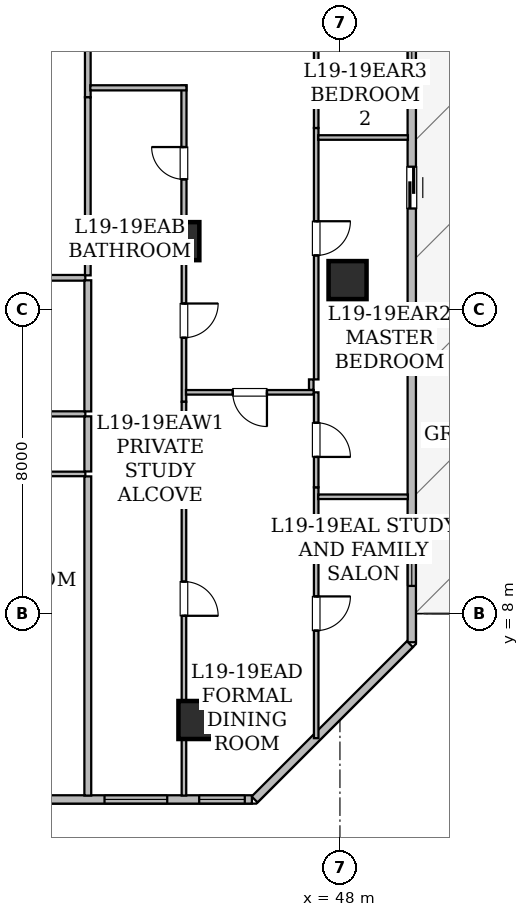
"""IFC4 building model, lengths in metres.
Left out: names, types, materials, properties, quantities, classifications, styles, units other than length and angle.
Written with IfcOpenShell. Run it as: python <this file> out.ifc"""

import sys

from ifc_helpers import new_model, si_unit, direction, frame, frame_2d, origin, origin_2d, place, context, subcontext, project, spatial, rectangle, hollow_rectangle, extrude, element, fill, save


model = new_model("IFC4")
c1 = context("Model", 3, precision=1e-05, world=origin(), true_north=direction((0.0, 1.0)))
c2 = subcontext(c1, "Body", "Model", "MODEL_VIEW")
j1 = project(units=[si_unit("LENGTHUNIT", "METRE"), si_unit("PLANEANGLEUNIT", "RADIAN")], contexts=[c1])
p1 = place(None, origin())
s1 = spatial("IfcSite", under=j1, at=p1, CompositionType="ELEMENT")
p2 = place(p1, origin())
s2 = spatial("IfcBuilding", under=s1, at=p2, CompositionType="ELEMENT")
p3 = place(p2, frame((0.0, 0.0, 77.1)))
s3 = spatial("IfcBuildingStorey", under=s2, at=p3, CompositionType="ELEMENT", Elevation=77.1)
for number, where, z_axis, x_axis in (
    (1, (44.25, 5.2, 0.0), (0.0, 0.0, 1.0), (1.0, 0.0, 0.0)),
    (2, (48.2, 16.775, 0.0), (0.0, 0.0, 1.0), (1.0, 0.0, 0.0)),
    (3, (43.8, 17.8, 0.0), (0.0, 0.0, 1.0), (1.0, 0.0, 0.0)),
):
    element("IfcColumn", number, at=place(p3, frame(where, z_axis=z_axis, x_axis=x_axis)), inside=s3, PredefinedType="COLUMN", context=c2, shape_type="SweptSolid", body=[
        extrude(hollow_rectangle(XDim=1.0, YDim=1.0, WallThickness=0.05, at=origin_2d()), origin(), (0.0, 0.0, 1.0), 3.65),
    ])
p4 = place(p3, frame((49.89, 24.707, 0.0), z_axis=(0.0, 0.0, 1.0), x_axis=(0.0, -1.0, 0.0)))
e4 = element("IfcWall", 4, at=p4, inside=s3, PredefinedType="STANDARD", context=c2, shape_type="SweptSolid", body=[
    extrude(rectangle(XDim=17.461, YDim=0.22, at=frame_2d((8.73, 0.0))), origin(), (0.0, 0.0, 1.0), 3.43),
])
p5 = place(p4, frame((4.948, 0.0, 0.0)))
e5 = element("IfcOpeningElement", 5, at=p5, cuts=e4, PredefinedType="OPENING", context=c2, shape_type="SweptSolid", body=[
    extrude(rectangle(XDim=1.1, YDim=2.2, at=frame_2d((0.55, 1.1))), frame((0.0, 0.12, 0.0), z_axis=(0.0, -1.0, 0.0), x_axis=(1.0, 0.0, 0.0)), (0.0, 0.0, 1.0), 0.24),
])
p6 = place(p4, frame((14.329, 0.0, 0.85)))
e6 = element("IfcOpeningElement", 6, at=p6, cuts=e4, PredefinedType="OPENING", context=c2, shape_type="SweptSolid", body=[
    extrude(rectangle(XDim=1.65, YDim=1.55, at=frame_2d((0.825, 0.775))), frame((0.0, 0.12, 0.0), z_axis=(0.0, -1.0, 0.0), x_axis=(1.0, 0.0, 0.0)), (0.0, 0.0, 1.0), 0.24),
])
p7 = place(p4, frame((1.657, 0.0, 0.85)))
e7 = element("IfcOpeningElement", 7, at=p7, cuts=e4, PredefinedType="OPENING", context=c2, shape_type="SweptSolid", body=[
    extrude(rectangle(XDim=1.65, YDim=1.55, at=frame_2d((0.825, 0.775))), frame((0.0, 0.12, 0.0), z_axis=(0.0, -1.0, 0.0), x_axis=(1.0, 0.0, 0.0)), (0.0, 0.0, 1.0), 0.24),
])
p8 = place(p3, frame((49.84, 7.196, 0.0), z_axis=(0.0, 0.0, 1.0), x_axis=(-0.707127905562, -0.70708565618, 0.0)))
e8 = element("IfcWall", 8, at=p8, inside=s3, PredefinedType="STANDARD", context=c2, shape_type="SweptSolid", body=[
    extrude(rectangle(XDim=5.779, YDim=0.22, at=frame_2d((2.889, 0.0))), origin(), (0.0, 0.0, 1.0), 3.43),
])
p9 = place(p3, frame((45.683, 3.11, 0.0), z_axis=(0.0, 0.0, 1.0), x_axis=(-1.0, 0.0, 0.0)))
e9 = element("IfcWall", 9, at=p9, inside=s3, PredefinedType="STANDARD", context=c2, shape_type="SweptSolid", body=[
    extrude(rectangle(XDim=37.368, YDim=0.22, at=frame_2d((18.684, 0.0))), origin(), (0.0, 0.0, 1.0), 3.43),
])
p10 = place(p9, frame((31.194, 0.0, 0.85)))
e10 = element("IfcOpeningElement", 10, at=p10, cuts=e9, PredefinedType="OPENING", context=c2, shape_type="SweptSolid", body=[
    extrude(rectangle(XDim=1.65, YDim=1.55, at=frame_2d((0.825, 0.775))), frame((0.0, 0.12, 0.0), z_axis=(0.0, -1.0, 0.0), x_axis=(1.0, 0.0, 0.0)), (0.0, 0.0, 1.0), 0.24),
])
p11 = place(p9, frame((19.615, 0.0, 0.85)))
e11 = element("IfcOpeningElement", 11, at=p11, cuts=e9, PredefinedType="OPENING", context=c2, shape_type="SweptSolid", body=[
    extrude(rectangle(XDim=1.65, YDim=1.55, at=frame_2d((0.825, 0.775))), frame((0.0, 0.12, 0.0), z_axis=(0.0, -1.0, 0.0), x_axis=(1.0, 0.0, 0.0)), (0.0, 0.0, 1.0), 0.24),
])
p12 = place(p9, frame((22.223, 0.0, 0.8)))
e12 = element("IfcOpeningElement", 12, at=p12, cuts=e9, PredefinedType="OPENING", context=c2, shape_type="SweptSolid", body=[
    extrude(rectangle(XDim=1.2, YDim=1.5, at=frame_2d((0.6, 0.75))), frame((0.0, 0.12, 0.0), z_axis=(0.0, -1.0, 0.0), x_axis=(1.0, 0.0, 0.0)), (0.0, 0.0, 1.0), 0.24),
])
p13 = place(p9, frame((25.65, 0.0, 0.85)))
e13 = element("IfcOpeningElement", 13, at=p13, cuts=e9, PredefinedType="OPENING", context=c2, shape_type="SweptSolid", body=[
    extrude(rectangle(XDim=1.65, YDim=1.55, at=frame_2d((0.825, 0.775))), frame((0.0, 0.12, 0.0), z_axis=(0.0, -1.0, 0.0), x_axis=(1.0, 0.0, 0.0)), (0.0, 0.0, 1.0), 0.24),
])
p14 = place(p9, frame((10.983, 0.0, 0.8)))
e14 = element("IfcOpeningElement", 14, at=p14, cuts=e9, PredefinedType="OPENING", context=c2, shape_type="SweptSolid", body=[
    extrude(rectangle(XDim=1.2, YDim=1.5, at=frame_2d((0.6, 0.75))), frame((0.0, 0.12, 0.0), z_axis=(0.0, -1.0, 0.0), x_axis=(1.0, 0.0, 0.0)), (0.0, 0.0, 1.0), 0.24),
])
p15 = place(p9, frame((14.783, 0.0, 0.85)))
e15 = element("IfcOpeningElement", 15, at=p15, cuts=e9, PredefinedType="OPENING", context=c2, shape_type="SweptSolid", body=[
    extrude(rectangle(XDim=1.65, YDim=1.55, at=frame_2d((0.825, 0.775))), frame((0.0, 0.12, 0.0), z_axis=(0.0, -1.0, 0.0), x_axis=(1.0, 0.0, 0.0)), (0.0, 0.0, 1.0), 0.24),
])
p16 = place(p9, frame((6.733, 0.0, 0.85)))
e16 = element("IfcOpeningElement", 16, at=p16, cuts=e9, PredefinedType="OPENING", context=c2, shape_type="SweptSolid", body=[
    extrude(rectangle(XDim=1.65, YDim=1.55, at=frame_2d((0.825, 0.775))), frame((0.0, 0.12, 0.0), z_axis=(0.0, -1.0, 0.0), x_axis=(1.0, 0.0, 0.0)), (0.0, 0.0, 1.0), 0.24),
])
p17 = place(p9, frame((2.228, 0.0, 0.85)))
e17 = element("IfcOpeningElement", 17, at=p17, cuts=e9, PredefinedType="OPENING", context=c2, shape_type="SweptSolid", body=[
    extrude(rectangle(XDim=1.65, YDim=1.55, at=frame_2d((0.825, 0.775))), frame((0.0, 0.12, 0.0), z_axis=(0.0, -1.0, 0.0), x_axis=(1.0, 0.0, 0.0)), (0.0, 0.0, 1.0), 0.24),
])
p18 = place(p9, frame((0.187, 0.0, 0.8)))
e18 = element("IfcOpeningElement", 18, at=p18, cuts=e9, PredefinedType="OPENING", context=c2, shape_type="SweptSolid", body=[
    extrude(rectangle(XDim=1.2, YDim=1.5, at=frame_2d((0.6, 0.75))), frame((0.0, 0.12, 0.0), z_axis=(0.0, -1.0, 0.0), x_axis=(1.0, 0.0, 0.0)), (0.0, 0.0, 1.0), 0.24),
])
p19 = place(p3, frame((41.3, 16.835, 0.0), z_axis=(0.0, 0.0, 1.0), x_axis=(-1.0, 0.0, 0.0)))
e19 = element("IfcWall", 19, at=p19, inside=s3, PredefinedType="STANDARD", context=c2, shape_type="SweptSolid", body=[
    extrude(rectangle(XDim=7.001, YDim=0.15, at=frame_2d((3.5, 0.0))), origin(), (0.0, 0.0, 1.0), 3.43),
])
p20 = place(p3, frame((41.365, 18.118, 0.0), z_axis=(0.0, 0.0, 1.0), x_axis=(0.0, -1.0, 0.0)))
e20 = element("IfcWall", 20, at=p20, inside=s3, PredefinedType="STANDARD", context=c2, shape_type="SweptSolid", body=[
    extrude(rectangle(XDim=1.218, YDim=0.15, at=frame_2d((0.609, 0.0))), origin(), (0.0, 0.0, 1.0), 3.43),
])
p21 = place(p3, frame((41.365, 24.283, 0.0), z_axis=(0.0, 0.0, 1.0), x_axis=(0.0, -1.0, 0.0)))
e21 = element("IfcWall", 21, at=p21, inside=s3, PredefinedType="STANDARD", context=c2, shape_type="SweptSolid", body=[
    extrude(rectangle(XDim=2.698, YDim=0.15, at=frame_2d((1.349, 0.0))), origin(), (0.0, 0.0, 1.0), 3.43),
])
p22 = place(p3, frame((41.365, 21.585, 0.0), z_axis=(0.0, 0.0, 1.0), x_axis=(0.0, -1.0, 0.0)))
e22 = element("IfcWall", 22, at=p22, inside=s3, PredefinedType="STANDARD", context=c2, shape_type="SweptSolid", body=[
    extrude(rectangle(XDim=3.467, YDim=0.15, at=frame_2d((1.733, 0.0))), origin(), (0.0, 0.0, 1.0), 2.647),
])
p23 = place(p3, frame((33.985, 13.255, 0.0), z_axis=(0.0, 0.0, 1.0), x_axis=(1.0, 0.0, 0.0)))
e23 = element("IfcWall", 23, at=p23, inside=s3, PredefinedType="PARTITIONING", context=c2, shape_type="SweptSolid", body=[
    extrude(rectangle(XDim=7.315, YDim=0.135, at=frame_2d((3.657, 0.0))), origin(), (0.0, 0.0, 1.0), 3.43),
])
p24 = place(p23, frame((3.233, 0.0, 0.0)))
e24 = element("IfcOpeningElement", 24, at=p24, cuts=e23, PredefinedType="OPENING", context=c2, shape_type="SweptSolid", body=[
    extrude(rectangle(XDim=0.85, YDim=2.1, at=frame_2d((0.425, 1.05))), frame((0.0, 0.077, 0.0), z_axis=(0.0, -1.0, 0.0), x_axis=(1.0, 0.0, 0.0)), (0.0, 0.0, 1.0), 0.155),
])
p25 = place(p3, frame((41.3, 11.675, 0.0), z_axis=(0.0, 0.0, 1.0), x_axis=(-1.0, 0.0, 0.0)))
e25 = element("IfcWall", 25, at=p25, inside=s3, PredefinedType="PARTITIONING", context=c2, shape_type="SweptSolid", body=[
    extrude(rectangle(XDim=6.48, YDim=0.12, at=frame_2d((3.24, 0.0))), origin(), (0.0, 0.0, 1.0), 3.43),
])
p26 = place(p3, frame((41.365, 13.19, 0.0), z_axis=(0.0, 0.0, 1.0), x_axis=(0.0, -1.0, 0.0)))
e26 = element("IfcWall", 26, at=p26, inside=s3, PredefinedType="STANDARD", context=c2, shape_type="SweptSolid", body=[
    extrude(rectangle(XDim=1.45, YDim=0.18, at=frame_2d((0.725, 0.0))), origin(), (0.0, 0.0, 1.0), 3.43),
])
p27 = place(p3, frame((41.365, 16.77, 0.0), z_axis=(0.0, 0.0, 1.0), x_axis=(0.0, -1.0, 0.0)))
e27 = element("IfcWall", 27, at=p27, inside=s3, PredefinedType="STANDARD", context=c2, shape_type="SweptSolid", body=[
    extrude(rectangle(XDim=3.45, YDim=0.18, at=frame_2d((1.725, 0.0))), origin(), (0.0, 0.0, 1.0), 3.43),
])
p28 = place(p3, frame((41.365, 11.61, 0.0), z_axis=(0.0, 0.0, 1.0), x_axis=(0.0, -1.0, 0.0)))
e28 = element("IfcWall", 28, at=p28, inside=s3, PredefinedType="STANDARD", context=c2, shape_type="SweptSolid", body=[
    extrude(rectangle(XDim=8.398, YDim=0.18, at=frame_2d((4.199, 0.0))), origin(), (0.0, 0.0, 1.0), 2.803),
])
p29 = place(p3, frame((43.895, 17.804, 0.0), z_axis=(0.0, 0.0, 1.0), x_axis=(0.0, -1.0, 0.0)))
e29 = element("IfcWall", 29, at=p29, inside=s3, PredefinedType="PARTITIONING", context=c2, shape_type="SweptSolid", body=[
    extrude(rectangle(XDim=4.231, YDim=0.12, at=frame_2d((2.115, 0.0))), origin(), (0.0, 0.0, 1.0), 2.647),
])
p30 = place(p29, frame((1.645, 0.0, 0.0)))
e30 = element("IfcOpeningElement", 30, at=p30, cuts=e29, PredefinedType="OPENING", context=c2, shape_type="SweptSolid", body=[
    extrude(rectangle(XDim=0.9, YDim=2.1, at=frame_2d((0.45, 1.05))), frame((0.0, 0.07, 0.0), z_axis=(0.0, -1.0, 0.0), x_axis=(1.0, 0.0, 0.0)), (0.0, 0.0, 1.0), 0.14),
])
p31 = place(p3, frame((43.895, 13.573, 0.0), z_axis=(0.0, 0.0, 1.0), x_axis=(0.0, -1.0, 0.0)))
e31 = element("IfcWall", 31, at=p31, inside=s3, PredefinedType="PARTITIONING", context=c2, shape_type="SweptSolid", body=[
    extrude(rectangle(XDim=10.361, YDim=0.12, at=frame_2d((5.181, 0.0))), origin(), (0.0, 0.0, 1.0), 2.647),
])
p32 = place(p31, frame((4.731, 0.0, 0.0)))
e32 = element("IfcOpeningElement", 32, at=p32, cuts=e31, PredefinedType="OPENING", context=c2, shape_type="SweptSolid", body=[
    extrude(rectangle(XDim=0.9, YDim=2.1, at=frame_2d((0.45, 1.05))), frame((0.0, 0.07, 0.0), z_axis=(0.0, -1.0, 0.0), x_axis=(1.0, 0.0, 0.0)), (0.0, 0.0, 1.0), 0.14),
])
p33 = place(p3, frame((41.432, 17.869, 0.0), z_axis=(0.0, 0.0, 1.0), x_axis=(1.0, 0.0, 0.0)))
e33 = element("IfcWall", 33, at=p33, inside=s3, PredefinedType="PARTITIONING", context=c2, shape_type="SweptSolid", body=[
    extrude(rectangle(XDim=2.398, YDim=0.135, at=frame_2d((1.199, 0.0))), origin(), (0.0, 0.0, 1.0), 2.647),
])
p34 = place(p3, frame((47.31, 13.822, 0.0), z_axis=(0.0, 0.0, 1.0), x_axis=(-1.0, 0.0, 0.0)))
e34 = element("IfcWall", 34, at=p34, inside=s3, PredefinedType="PARTITIONING", context=c2, shape_type="SweptSolid", body=[
    extrude(rectangle(XDim=3.361, YDim=0.12, at=frame_2d((1.681, 0.0))), origin(), (0.0, 0.0, 1.0), 2.647),
])
p35 = place(p34, frame((1.231, 0.0, 0.0)))
e35 = element("IfcOpeningElement", 35, at=p35, cuts=e34, PredefinedType="OPENING", context=c2, shape_type="SweptSolid", body=[
    extrude(rectangle(XDim=0.9, YDim=2.1, at=frame_2d((0.45, 1.05))), frame((0.0, 0.07, 0.0), z_axis=(0.0, -1.0, 0.0), x_axis=(1.0, 0.0, 0.0)), (0.0, 0.0, 1.0), 0.14),
])
p36 = place(p3, frame((47.245, 14.162, 0.0), z_axis=(0.0, 0.0, 1.0), x_axis=(0.0, -1.0, 0.0)))
e36 = element("IfcWall", 36, at=p36, inside=s3, PredefinedType="PARTITIONING", context=c2, shape_type="SweptSolid", body=[
    extrude(rectangle(XDim=0.275, YDim=0.12, at=frame_2d((0.138, 0.0))), origin(), (0.0, 0.0, 1.0), 2.803),
])
p37 = place(p3, frame((43.895, 17.804, 0.0), z_axis=(0.0, 0.0, 1.0), x_axis=(0.0, 1.0, 0.0)))
e37 = element("IfcWall", 37, at=p37, inside=s3, PredefinedType="PARTITIONING", context=c2, shape_type="SweptSolid", body=[
    extrude(rectangle(XDim=4.095, YDim=0.135, at=frame_2d((2.047, 0.0))), origin(), (0.0, 0.0, 1.0), 2.647),
])
p38 = place(p37, frame((1.622, 0.0, 0.0)))
e38 = element("IfcOpeningElement", 38, at=p38, cuts=e37, PredefinedType="OPENING", context=c2, shape_type="SweptSolid", body=[
    extrude(rectangle(XDim=0.85, YDim=2.1, at=frame_2d((0.425, 1.05))), frame((0.0, 0.077, 0.0), z_axis=(0.0, -1.0, 0.0), x_axis=(1.0, 0.0, 0.0)), (0.0, 0.0, 1.0), 0.155),
])
p39 = place(p3, frame((43.96, 21.834, 0.0), z_axis=(0.0, 0.0, 1.0), x_axis=(-1.0, 0.0, 0.0)))
e39 = element("IfcWall", 39, at=p39, inside=s3, PredefinedType="PARTITIONING", context=c2, shape_type="SweptSolid", body=[
    extrude(rectangle(XDim=2.528, YDim=0.135, at=frame_2d((1.264, 0.0))), origin(), (0.0, 0.0, 1.0), 2.647),
])
p40 = place(p3, frame((47.375, 20.777, 0.0), z_axis=(0.0, 0.0, 1.0), x_axis=(0.0, -1.0, 0.0)))
e40 = element("IfcWall", 40, at=p40, inside=s3, PredefinedType="PARTITIONING", context=c2, shape_type="SweptSolid", body=[
    extrude(rectangle(XDim=6.615, YDim=0.12, at=frame_2d((3.308, 0.0))), origin(), (0.0, 0.0, 1.0), 2.647),
])
p41 = place(p40, frame((2.453, 0.0, 0.0)))
e41 = element("IfcOpeningElement", 41, at=p41, cuts=e40, PredefinedType="OPENING", context=c2, shape_type="SweptSolid", body=[
    extrude(rectangle(XDim=0.9, YDim=2.1, at=frame_2d((0.45, 1.05))), frame((0.0, 0.07, 0.0), z_axis=(0.0, -1.0, 0.0), x_axis=(1.0, 0.0, 0.0)), (0.0, 0.0, 1.0), 0.14),
])
p42 = place(p3, frame((47.375, 31.47, 0.0), z_axis=(0.0, 0.0, 1.0), x_axis=(0.0, -1.0, 0.0)))
e42 = element("IfcWall", 42, at=p42, inside=s3, PredefinedType="PARTITIONING", context=c2, shape_type="SweptSolid", body=[
    extrude(rectangle(XDim=10.693, YDim=0.12, at=frame_2d((5.346, 0.0))), origin(), (0.0, 0.0, 1.0), 2.961),
])
p43 = place(p42, frame((4.896, 0.0, 0.0)))
e43 = element("IfcOpeningElement", 43, at=p43, cuts=e42, PredefinedType="OPENING", context=c2, shape_type="SweptSolid", body=[
    extrude(rectangle(XDim=0.9, YDim=2.1, at=frame_2d((0.45, 1.05))), frame((0.0, 0.07, 0.0), z_axis=(0.0, -1.0, 0.0), x_axis=(1.0, 0.0, 0.0)), (0.0, 0.0, 1.0), 0.14),
])
p44 = place(p3, frame((47.375, 11.323, 0.0), z_axis=(0.0, 0.0, 1.0), x_axis=(0.0, -1.0, 0.0)))
e44 = element("IfcWall", 44, at=p44, inside=s3, PredefinedType="PARTITIONING", context=c2, shape_type="SweptSolid", body=[
    extrude(rectangle(XDim=6.601, YDim=0.12, at=frame_2d((3.301, 0.0))), origin(), (0.0, 0.0, 1.0), 3.43),
])
p45 = place(p44, frame((2.871, 0.0, 0.0)))
e45 = element("IfcOpeningElement", 45, at=p45, cuts=e44, PredefinedType="OPENING", context=c2, shape_type="SweptSolid", body=[
    extrude(rectangle(XDim=0.9, YDim=2.1, at=frame_2d((0.45, 1.05))), frame((0.0, 0.07, 0.0), z_axis=(0.0, -1.0, 0.0), x_axis=(1.0, 0.0, 0.0)), (0.0, 0.0, 1.0), 0.14),
])
p46 = place(p3, frame((47.375, 13.822, 0.0), z_axis=(0.0, 0.0, 1.0), x_axis=(0.0, -1.0, 0.0)))
e46 = element("IfcWall", 46, at=p46, inside=s3, PredefinedType="PARTITIONING", context=c2, shape_type="SweptSolid", body=[
    extrude(rectangle(XDim=2.499, YDim=0.12, at=frame_2d((1.25, 0.0))), origin(), (0.0, 0.0, 1.0), 2.803),
])
p47 = place(p46, frame((0.8, 0.0, 0.0)))
e47 = element("IfcOpeningElement", 47, at=p47, cuts=e46, PredefinedType="OPENING", context=c2, shape_type="SweptSolid", body=[
    extrude(rectangle(XDim=0.9, YDim=2.1, at=frame_2d((0.45, 1.05))), frame((0.0, 0.07, 0.0), z_axis=(0.0, -1.0, 0.0), x_axis=(1.0, 0.0, 0.0)), (0.0, 0.0, 1.0), 0.14),
])
p48 = place(p3, frame((47.429, 11.074, 0.0), z_axis=(0.0, 0.0, 1.0), x_axis=(1.0, 0.0, 0.0)))
e48 = element("IfcWall", 48, at=p48, inside=s3, PredefinedType="PARTITIONING", context=c2, shape_type="SweptSolid", body=[
    extrude(rectangle(XDim=2.359, YDim=0.12, at=frame_2d((1.18, 0.0))), origin(), (0.0, 0.0, 1.0), 3.43),
])
p49 = place(p3, frame((47.429, 20.527, 0.0), z_axis=(0.0, 0.0, 1.0), x_axis=(1.0, 0.0, 0.0)))
e49 = element("IfcWall", 49, at=p49, inside=s3, PredefinedType="PARTITIONING", context=c2, shape_type="SweptSolid", body=[
    extrude(rectangle(XDim=2.359, YDim=0.12, at=frame_2d((1.18, 0.0))), origin(), (0.0, 0.0, 1.0), 2.803),
])
p50 = place(p5, origin())
e50 = element("IfcDoor", 50, at=p50, inside=s3, OperationType="SLIDING_TO_LEFT", PredefinedType="DOOR", context=c2, shape_type="SweptSolid", body=[
    extrude(rectangle(XDim=1.1, YDim=2.2, at=frame_2d((0.55, 1.1))), frame((0.0, 0.025, 0.0), z_axis=(0.0, -1.0, 0.0), x_axis=(1.0, 0.0, 0.0)), (0.0, 0.0, 1.0), 0.05),
])
fill(e5, e50)
p51 = place(p17, origin())
e51 = element("IfcWindow", 51, at=p51, inside=s3, PartitioningType="SINGLE_PANEL", PredefinedType="WINDOW", context=c2, shape_type="SweptSolid", body=[
    extrude(rectangle(XDim=1.65, YDim=1.55, at=frame_2d((0.825, 0.775))), frame((0.0, 0.03, 0.0), z_axis=(0.0, -1.0, 0.0), x_axis=(1.0, 0.0, 0.0)), (0.0, 0.0, 1.0), 0.06),
])
fill(e17, e51)
p52 = place(p18, origin())
e52 = element("IfcWindow", 52, at=p52, inside=s3, PartitioningType="SINGLE_PANEL", PredefinedType="WINDOW", context=c2, shape_type="SweptSolid", body=[
    extrude(rectangle(XDim=1.2, YDim=1.5, at=frame_2d((0.6, 0.75))), frame((0.0, 0.03, 0.0), z_axis=(0.0, -1.0, 0.0), x_axis=(1.0, 0.0, 0.0)), (0.0, 0.0, 1.0), 0.06),
])
fill(e18, e52)
p53 = place(p6, origin())
e53 = element("IfcWindow", 53, at=p53, inside=s3, PartitioningType="SINGLE_PANEL", PredefinedType="WINDOW", context=c2, shape_type="SweptSolid", body=[
    extrude(rectangle(XDim=1.65, YDim=1.55, at=frame_2d((0.825, 0.775))), frame((0.0, 0.03, 0.0), z_axis=(0.0, -1.0, 0.0), x_axis=(1.0, 0.0, 0.0)), (0.0, 0.0, 1.0), 0.06),
])
fill(e6, e53)
p54 = place(p7, origin())
e54 = element("IfcWindow", 54, at=p54, inside=s3, PartitioningType="SINGLE_PANEL", PredefinedType="WINDOW", context=c2, shape_type="SweptSolid", body=[
    extrude(rectangle(XDim=1.65, YDim=1.55, at=frame_2d((0.825, 0.775))), frame((0.0, 0.03, 0.0), z_axis=(0.0, -1.0, 0.0), x_axis=(1.0, 0.0, 0.0)), (0.0, 0.0, 1.0), 0.06),
])
fill(e7, e54)
p55 = place(p30, origin())
e55 = element("IfcDoor", 55, at=p55, inside=s3, OperationType="SINGLE_SWING_LEFT", PredefinedType="DOOR", context=c2, shape_type="SweptSolid", body=[
    extrude(rectangle(XDim=0.9, YDim=2.1, at=frame_2d((0.45, 1.05))), frame((0.0, 0.025, 0.0), z_axis=(0.0, -1.0, 0.0), x_axis=(1.0, 0.0, 0.0)), (0.0, 0.0, 1.0), 0.05),
])
fill(e30, e55)
p56 = place(p32, origin())
e56 = element("IfcDoor", 56, at=p56, inside=s3, OperationType="SINGLE_SWING_RIGHT", PredefinedType="DOOR", context=c2, shape_type="SweptSolid", body=[
    extrude(rectangle(XDim=0.9, YDim=2.1, at=frame_2d((0.45, 1.05))), frame((0.0, 0.025, 0.0), z_axis=(0.0, -1.0, 0.0), x_axis=(1.0, 0.0, 0.0)), (0.0, 0.0, 1.0), 0.05),
])
fill(e32, e56)
p57 = place(p35, origin())
e57 = element("IfcDoor", 57, at=p57, inside=s3, OperationType="SINGLE_SWING_LEFT", PredefinedType="DOOR", context=c2, shape_type="SweptSolid", body=[
    extrude(rectangle(XDim=0.9, YDim=2.1, at=frame_2d((0.45, 1.05))), frame((0.0, 0.025, 0.0), z_axis=(0.0, -1.0, 0.0), x_axis=(1.0, 0.0, 0.0)), (0.0, 0.0, 1.0), 0.05),
])
fill(e35, e57)
p58 = place(p38, origin())
e58 = element("IfcDoor", 58, at=p58, inside=s3, OperationType="SINGLE_SWING_RIGHT", PredefinedType="DOOR", context=c2, shape_type="SweptSolid", body=[
    extrude(rectangle(XDim=0.85, YDim=2.1, at=frame_2d((0.425, 1.05))), frame((0.0, 0.025, 0.0), z_axis=(0.0, -1.0, 0.0), x_axis=(1.0, 0.0, 0.0)), (0.0, 0.0, 1.0), 0.05),
])
fill(e38, e58)
p59 = place(p41, origin())
e59 = element("IfcDoor", 59, at=p59, inside=s3, OperationType="SINGLE_SWING_LEFT", PredefinedType="DOOR", context=c2, shape_type="SweptSolid", body=[
    extrude(rectangle(XDim=0.9, YDim=2.1, at=frame_2d((0.45, 1.05))), frame((0.0, 0.025, 0.0), z_axis=(0.0, -1.0, 0.0), x_axis=(1.0, 0.0, 0.0)), (0.0, 0.0, 1.0), 0.05),
])
fill(e41, e59)
p60 = place(p45, origin())
e60 = element("IfcDoor", 60, at=p60, inside=s3, OperationType="SINGLE_SWING_LEFT", PredefinedType="DOOR", context=c2, shape_type="SweptSolid", body=[
    extrude(rectangle(XDim=0.9, YDim=2.1, at=frame_2d((0.45, 1.05))), frame((0.0, 0.025, 0.0), z_axis=(0.0, -1.0, 0.0), x_axis=(1.0, 0.0, 0.0)), (0.0, 0.0, 1.0), 0.05),
])
fill(e45, e60)
p61 = place(p47, origin())
e61 = element("IfcDoor", 61, at=p61, inside=s3, OperationType="SINGLE_SWING_RIGHT", PredefinedType="DOOR", context=c2, shape_type="SweptSolid", body=[
    extrude(rectangle(XDim=0.9, YDim=2.1, at=frame_2d((0.45, 1.05))), frame((0.0, 0.025, 0.0), z_axis=(0.0, -1.0, 0.0), x_axis=(1.0, 0.0, 0.0)), (0.0, 0.0, 1.0), 0.05),
])
fill(e47, e61)
save(model, sys.argv[1])
